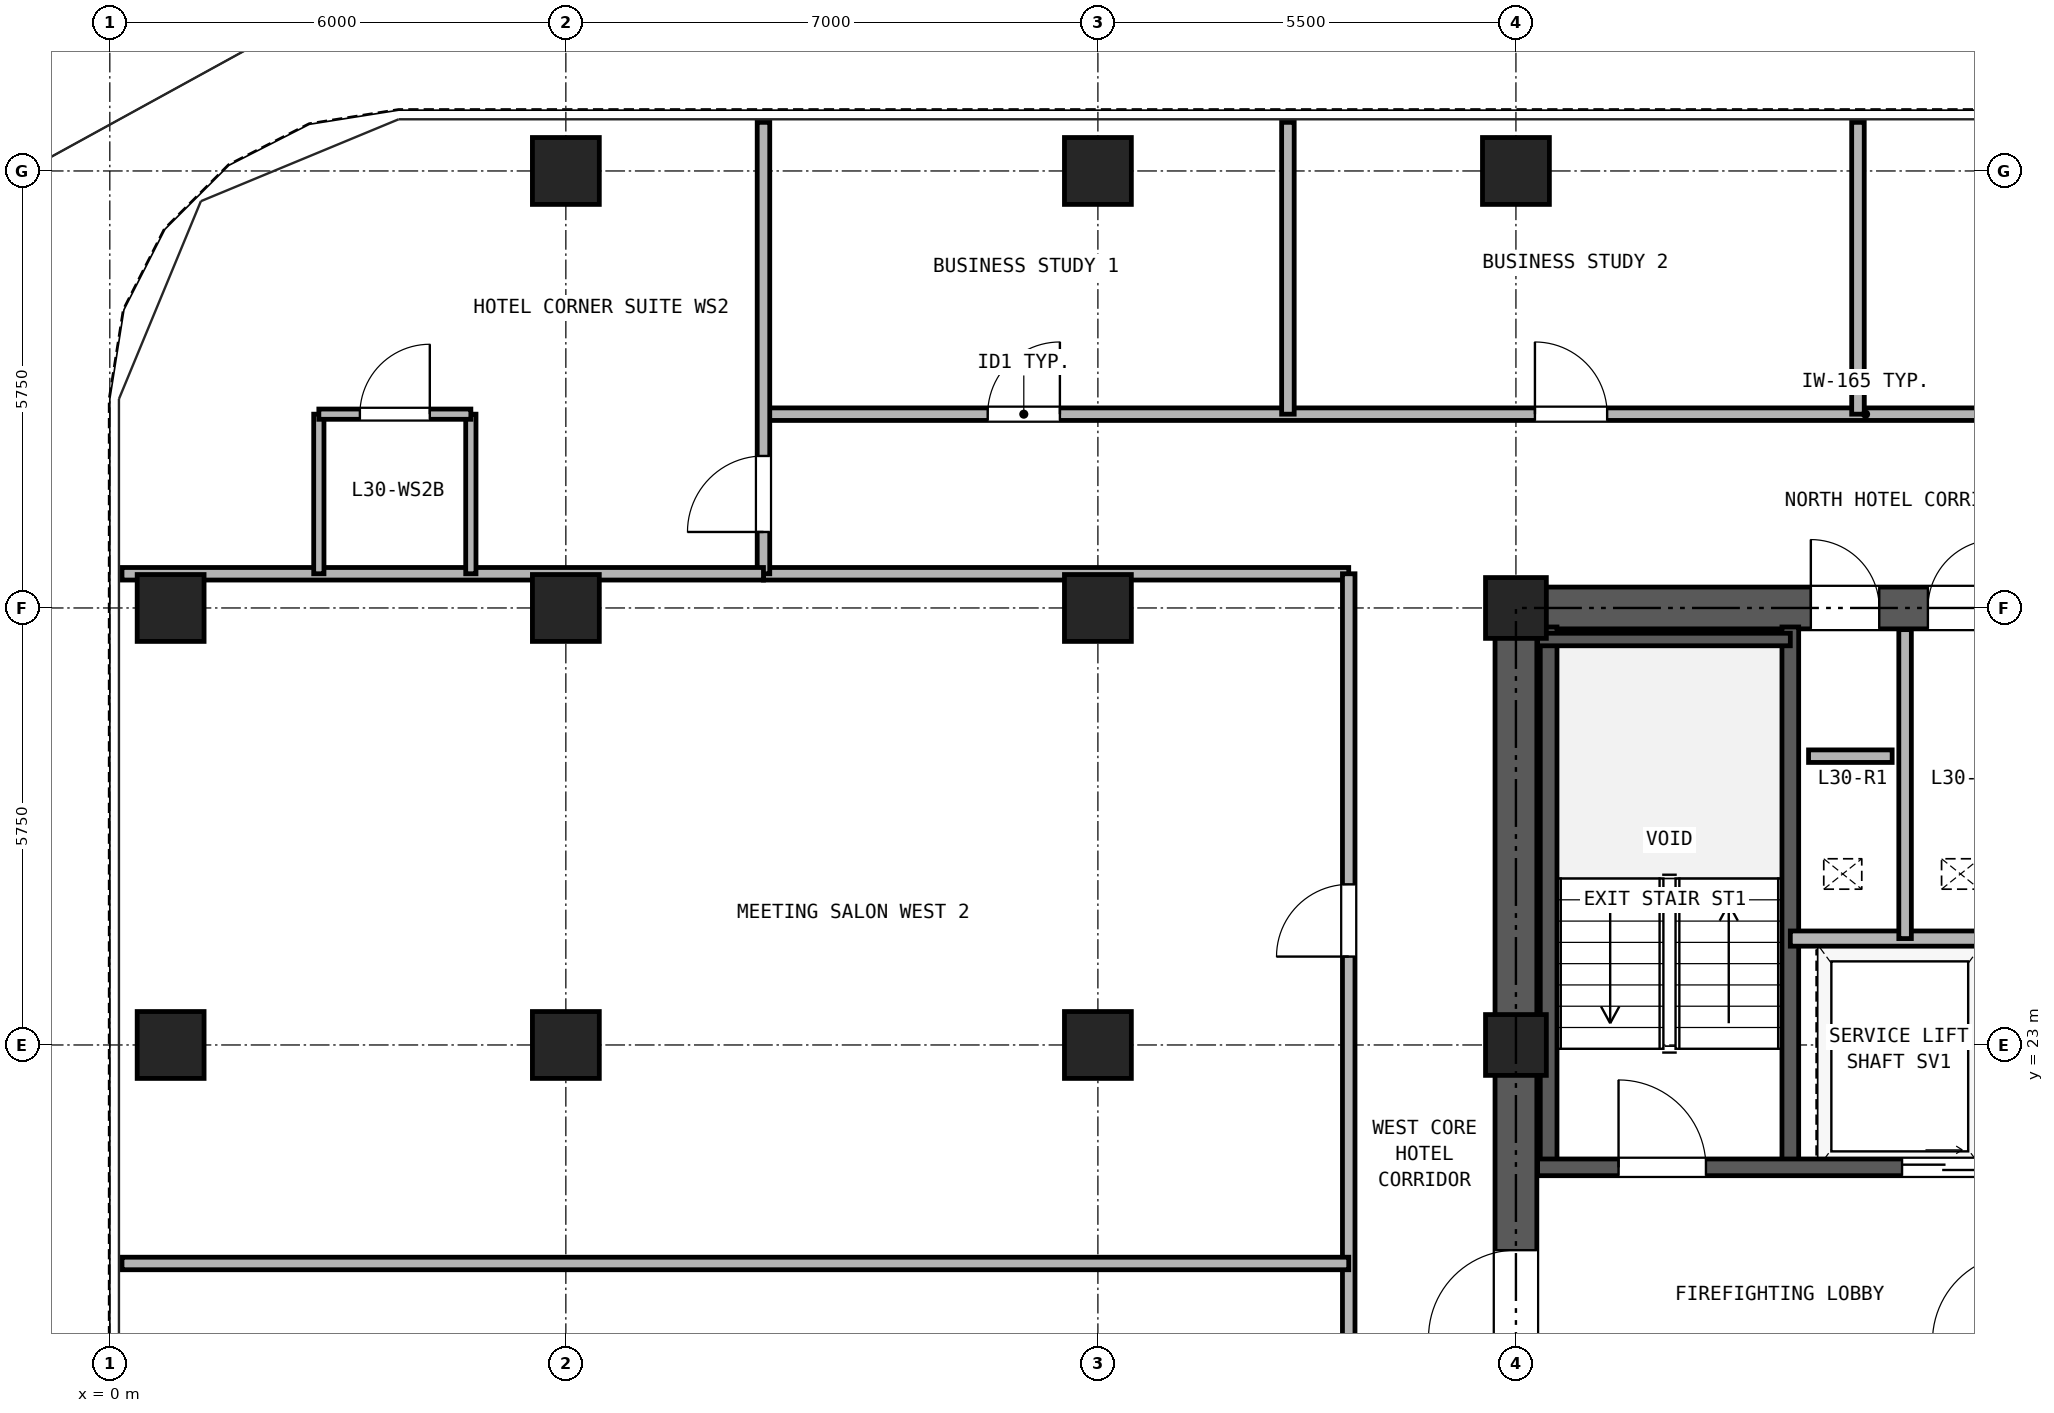
"""IFC4 building model, lengths in metres.
Left out: names, types, materials, properties, quantities, classifications, styles, units other than length and angle.
Written with IfcOpenShell. Run it as: python <this file> out.ifc"""

import sys

from ifc_helpers import new_model, si_unit, direction, frame, frame_2d, origin, origin_2d, place, context, subcontext, project, spatial, rectangle, hollow_rectangle, extrude, source, transform, mapped, element, fill, save


model = new_model("IFC4")
c1 = context("Model", 3, precision=1e-05, world=origin(), true_north=direction((0.0, 1.0)))
c2 = subcontext(c1, "Body", "Model", "MODEL_VIEW")
j1 = project(units=[si_unit("LENGTHUNIT", "METRE"), si_unit("PLANEANGLEUNIT", "RADIAN")], contexts=[c1])
p1 = place(None, origin())
s1 = spatial("IfcSite", under=j1, at=p1, CompositionType="ELEMENT")
p2 = place(p1, origin())
s2 = spatial("IfcBuilding", under=s1, at=p2, CompositionType="ELEMENT")
p3 = place(p2, frame((0.0, 0.0, 111.9)))
s3 = spatial("IfcBuildingStorey", under=s2, at=p3, CompositionType="ELEMENT", Elevation=111.9)
m1 = source(origin(), c2, "Body", "SweptSolid", [
    extrude(hollow_rectangle(XDim=0.88, YDim=0.88, WallThickness=0.05, at=origin_2d()), origin(), (0.0, 0.0, 1.0), 2.95),
])
for number, where, z_axis, x_axis in (
    (1, (6.0, 34.5, 0.0), (0.0, 0.0, 1.0), (1.0, 0.0, 0.0)),
    (2, (13.0, 34.5, 0.0), (0.0, 0.0, 1.0), (1.0, 0.0, 0.0)),
    (3, (18.5, 34.5, 0.0), (0.0, 0.0, 1.0), (1.0, 0.0, 0.0)),
    (4, (0.8, 23.0, 0.0), (0.0, 0.0, 1.0), (1.0, 0.0, 0.0)),
    (5, (0.8, 28.75, 0.0), (0.0, 0.0, 1.0), (1.0, 0.0, 0.0)),
    (6, (6.0, 23.0, 0.0), (0.0, 0.0, 1.0), (1.0, 0.0, 0.0)),
    (7, (6.0, 28.75, 0.0), (0.0, 0.0, 1.0), (1.0, 0.0, 0.0)),
    (8, (13.0, 23.0, 0.0), (0.0, 0.0, 1.0), (1.0, 0.0, 0.0)),
    (9, (13.0, 28.75, 0.0), (0.0, 0.0, 1.0), (1.0, 0.0, 0.0)),
):
    element("IfcColumn", number, at=place(p3, frame(where, z_axis=z_axis, x_axis=x_axis)), inside=s3, PredefinedType="COLUMN", context=c2, shape_type="MappedRepresentation", body=[
        mapped(m1, transform((0.0, 0.0, 0.0), x_axis=(1.0, 0.0, 0.0), y_axis=(0.0, 1.0, 0.0), z_axis=(0.0, 0.0, 1.0), scale=1.0)),
    ])
m2 = source(origin(), c2, "Body", "SweptSolid", [
    extrude(hollow_rectangle(XDim=0.8, YDim=0.8, WallThickness=0.045, at=origin_2d()), origin(), (0.0, 0.0, 1.0), 2.95),
])
for number, where, z_axis, x_axis in (
    (10, (18.5, 23.0, 0.0), (0.0, 0.0, 1.0), (1.0, 0.0, 0.0)),
    (11, (18.5, 28.75, 0.0), (0.0, 0.0, 1.0), (1.0, 0.0, 0.0)),
):
    element("IfcColumn", number, at=place(p3, frame(where, z_axis=z_axis, x_axis=x_axis)), inside=s3, PredefinedType="COLUMN", context=c2, shape_type="MappedRepresentation", body=[
        mapped(m2, transform((0.0, 0.0, 0.0), x_axis=(1.0, 0.0, 0.0), y_axis=(0.0, 1.0, 0.0), z_axis=(0.0, 0.0, 1.0), scale=1.0)),
    ])
p4 = place(p3, frame((18.225, 28.75, 0.0), z_axis=(0.0, 0.0, 1.0), x_axis=(1.0, 0.0, 0.0)))
e12 = element("IfcWall", 12, at=p4, inside=s3, PredefinedType="SHEAR", context=c2, shape_type="SweptSolid", body=[
    extrude(rectangle(XDim=10.55, YDim=0.55, at=frame_2d((5.275, 0.0))), origin(), (0.0, 0.0, 1.0), 2.95),
])
p5 = place(p4, frame((4.155, 0.0, 0.0)))
e13 = element("IfcOpeningElement", 13, at=p5, cuts=e12, PredefinedType="OPENING", context=c2, shape_type="SweptSolid", body=[
    extrude(rectangle(XDim=0.9, YDim=2.05, at=frame_2d((0.45, 1.025))), frame((0.0, 0.285, 0.0), z_axis=(0.0, -1.0, 0.0), x_axis=(1.0, 0.0, 0.0)), (0.0, 0.0, 1.0), 0.57),
])
p6 = place(p4, frame((5.695, 0.0, 0.0)))
e14 = element("IfcOpeningElement", 14, at=p6, cuts=e12, PredefinedType="OPENING", context=c2, shape_type="SweptSolid", body=[
    extrude(rectangle(XDim=0.9, YDim=2.05, at=frame_2d((0.45, 1.025))), frame((0.0, 0.285, 0.0), z_axis=(0.0, -1.0, 0.0), x_axis=(1.0, 0.0, 0.0)), (0.0, 0.0, 1.0), 0.57),
])
p7 = place(p3, frame((18.5, 11.775, 0.0), z_axis=(0.0, 0.0, 1.0), x_axis=(0.0, 1.0, 0.0)))
e15 = element("IfcWall", 15, at=p7, inside=s3, PredefinedType="SHEAR", context=c2, shape_type="SweptSolid", body=[
    extrude(rectangle(XDim=16.7, YDim=0.55, at=frame_2d((8.35, 0.0))), origin(), (0.0, 0.0, 1.0), 2.95),
])
p8 = place(p7, frame((7.375, 0.0, 0.0)))
e16 = element("IfcOpeningElement", 16, at=p8, cuts=e15, PredefinedType="OPENING", context=c2, shape_type="SweptSolid", body=[
    extrude(rectangle(XDim=1.15, YDim=2.2, at=frame_2d((0.575, 1.1))), frame((0.0, 0.285, 0.0), z_axis=(0.0, -1.0, 0.0), x_axis=(1.0, 0.0, 0.0)), (0.0, 0.0, 1.0), 0.57),
])
for number, where, z_axis, x_axis in (
    (17, (18.93, 21.39, 0.0), (0.0, 0.0, 1.0), (0.0, 1.0, 0.0)),
    (18, (22.11, 21.39, 0.0), (0.0, 0.0, 1.0), (0.0, 1.0, 0.0)),
):
    element("IfcWall", number, at=place(p3, frame(where, z_axis=z_axis, x_axis=x_axis)), inside=s3, PredefinedType="SOLIDWALL", context=c2, shape_type="SweptSolid", body=[
        extrude(rectangle(XDim=7.11, YDim=0.22, at=frame_2d((3.555, 0.0))), origin(), (0.0, 0.0, 1.0), 2.95),
    ])
p9 = place(p3, frame((18.785, 28.335, 0.0), z_axis=(0.0, 0.0, 1.0), x_axis=(1.0, 0.0, 0.0)))
e19 = element("IfcWall", 19, at=p9, inside=s3, PredefinedType="PARTITIONING", context=c2, shape_type="SweptSolid", body=[
    extrude(rectangle(XDim=3.325, YDim=0.165, at=frame_2d((1.663, 0.0))), origin(), (0.0, 0.0, 1.0), 2.95),
])
p10 = place(p3, frame((18.785, 21.39, 0.0), z_axis=(0.0, 0.0, 1.0), x_axis=(1.0, 0.0, 0.0)))
e20 = element("IfcWall", 20, at=p10, inside=s3, PredefinedType="SOLIDWALL", context=c2, shape_type="SweptSolid", body=[
    extrude(rectangle(XDim=6.345, YDim=0.22, at=frame_2d((3.172, 0.0))), origin(), (0.0, 0.0, 1.0), 2.95),
])
p11 = place(p10, frame((1.065, 0.0, 0.0)))
e21 = element("IfcOpeningElement", 21, at=p11, cuts=e20, PredefinedType="OPENING", context=c2, shape_type="SweptSolid", body=[
    extrude(rectangle(XDim=1.15, YDim=2.2, at=frame_2d((0.575, 1.1))), frame((0.0, 0.12, 0.0), z_axis=(0.0, -1.0, 0.0), x_axis=(1.0, 0.0, 0.0)), (0.0, 0.0, 1.0), 0.24),
])
p12 = place(p10, frame((4.795, 0.0, 0.0)))
e22 = element("IfcOpeningElement", 22, at=p12, cuts=e20, PredefinedType="OPENING", context=c2, shape_type="SweptSolid", body=[
    extrude(rectangle(XDim=1.1, YDim=2.25, at=frame_2d((0.55, 1.125))), frame((0.0, 0.12, 0.0), z_axis=(0.0, -1.0, 0.0), x_axis=(1.0, 0.0, 0.0)), (0.0, 0.0, 1.0), 0.24),
])
p13 = place(p3, frame((22.11, 24.4, 0.0), z_axis=(0.0, 0.0, 1.0), x_axis=(1.0, 0.0, 0.0)))
e23 = element("IfcWall", 23, at=p13, inside=s3, PredefinedType="PARTITIONING", context=c2, shape_type="SweptSolid", body=[
    extrude(rectangle(XDim=3.02, YDim=0.2, at=frame_2d((1.51, 0.0))), origin(), (0.0, 0.0, 1.0), 2.95),
])
p14 = place(p3, frame((23.62, 24.4, 0.0), z_axis=(0.0, 0.0, 1.0), x_axis=(0.0, 1.0, 0.0)))
e24 = element("IfcWall", 24, at=p14, inside=s3, PredefinedType="PARTITIONING", context=c2, shape_type="SweptSolid", body=[
    extrude(rectangle(XDim=4.065, YDim=0.165, at=frame_2d((2.033, 0.0))), origin(), (0.0, 0.0, 1.0), 2.95),
])
p15 = place(p3, frame((8.6, 31.3, 0.0), z_axis=(0.0, 0.0, 1.0), x_axis=(1.0, 0.0, 0.0)))
e25 = element("IfcWall", 25, at=p15, inside=s3, PredefinedType="PARTITIONING", context=c2, shape_type="SweptSolid", body=[
    extrude(rectangle(XDim=29.8, YDim=0.165, at=frame_2d((14.9, 0.0))), origin(), (0.0, 0.0, 1.0), 2.95),
])
p16 = place(p15, frame((2.95, 0.0, 0.0)))
e26 = element("IfcOpeningElement", 26, at=p16, cuts=e25, PredefinedType="OPENING", context=c2, shape_type="SweptSolid", body=[
    extrude(rectangle(XDim=0.95, YDim=2.15, at=frame_2d((0.475, 1.075))), frame((0.0, 0.093, 0.0), z_axis=(0.0, -1.0, 0.0), x_axis=(1.0, 0.0, 0.0)), (0.0, 0.0, 1.0), 0.185),
])
p17 = place(p15, frame((10.15, 0.0, 0.0)))
e27 = element("IfcOpeningElement", 27, at=p17, cuts=e25, PredefinedType="OPENING", context=c2, shape_type="SweptSolid", body=[
    extrude(rectangle(XDim=0.95, YDim=2.15, at=frame_2d((0.475, 1.075))), frame((0.0, 0.093, 0.0), z_axis=(0.0, -1.0, 0.0), x_axis=(1.0, 0.0, 0.0)), (0.0, 0.0, 1.0), 0.185),
])
p18 = place(p15, frame((17.9, 0.0, 0.0)))
e28 = element("IfcOpeningElement", 28, at=p18, cuts=e25, PredefinedType="OPENING", context=c2, shape_type="SweptSolid", body=[
    extrude(rectangle(XDim=0.95, YDim=2.15, at=frame_2d((0.475, 1.075))), frame((0.0, 0.093, 0.0), z_axis=(0.0, -1.0, 0.0), x_axis=(1.0, 0.0, 0.0)), (0.0, 0.0, 1.0), 0.185),
])
p19 = place(p15, frame((23.9, 0.0, 0.0)))
e29 = element("IfcOpeningElement", 29, at=p19, cuts=e25, PredefinedType="OPENING", context=c2, shape_type="SweptSolid", body=[
    extrude(rectangle(XDim=0.92, YDim=2.1, at=frame_2d((0.46, 1.05))), frame((0.0, 0.093, 0.0), z_axis=(0.0, -1.0, 0.0), x_axis=(1.0, 0.0, 0.0)), (0.0, 0.0, 1.0), 0.185),
])
p20 = place(p15, frame((27.6, 0.0, 0.0)))
e30 = element("IfcOpeningElement", 30, at=p20, cuts=e25, PredefinedType="OPENING", context=c2, shape_type="SweptSolid", body=[
    extrude(rectangle(XDim=0.92, YDim=2.1, at=frame_2d((0.46, 1.05))), frame((0.0, 0.093, 0.0), z_axis=(0.0, -1.0, 0.0), x_axis=(1.0, 0.0, 0.0)), (0.0, 0.0, 1.0), 0.185),
])
p21 = place(p3, frame((8.6, 29.2, 0.0), z_axis=(0.0, 0.0, 1.0), x_axis=(1.0, 0.0, 0.0)))
e31 = element("IfcWall", 31, at=p21, inside=s3, PredefinedType="PARTITIONING", context=c2, shape_type="SweptSolid", body=[
    extrude(rectangle(XDim=7.7, YDim=0.165, at=frame_2d((3.85, 0.0))), origin(), (0.0, 0.0, 1.0), 2.95),
])
p22 = place(p3, frame((16.3, 11.05, 0.0), z_axis=(0.0, 0.0, 1.0), x_axis=(0.0, 1.0, 0.0)))
e32 = element("IfcWall", 32, at=p22, inside=s3, PredefinedType="PARTITIONING", context=c2, shape_type="SweptSolid", body=[
    extrude(rectangle(XDim=18.15, YDim=0.165, at=frame_2d((9.075, 0.0))), origin(), (0.0, 0.0, 1.0), 2.95),
])
p23 = place(p22, frame((4.037, 0.0, 0.0)))
e33 = element("IfcOpeningElement", 33, at=p23, cuts=e32, PredefinedType="OPENING", context=c2, shape_type="SweptSolid", body=[
    extrude(rectangle(XDim=0.95, YDim=2.15, at=frame_2d((0.475, 1.075))), frame((0.0, 0.093, 0.0), z_axis=(0.0, -1.0, 0.0), x_axis=(1.0, 0.0, 0.0)), (0.0, 0.0, 1.0), 0.185),
])
p24 = place(p22, frame((13.113, 0.0, 0.0)))
e34 = element("IfcOpeningElement", 34, at=p24, cuts=e32, PredefinedType="OPENING", context=c2, shape_type="SweptSolid", body=[
    extrude(rectangle(XDim=0.95, YDim=2.15, at=frame_2d((0.475, 1.075))), frame((0.0, 0.093, 0.0), z_axis=(0.0, -1.0, 0.0), x_axis=(1.0, 0.0, 0.0)), (0.0, 0.0, 1.0), 0.185),
])
p25 = place(p3, frame((8.6, 29.2, 0.0), z_axis=(0.0, 0.0, 1.0), x_axis=(0.0, 1.0, 0.0)))
e35 = element("IfcWall", 35, at=p25, inside=s3, PredefinedType="PARTITIONING", context=c2, shape_type="SweptSolid", body=[
    extrude(rectangle(XDim=5.94, YDim=0.165, at=frame_2d((2.97, 0.0))), origin(), (0.0, 0.0, 1.0), 2.95),
])
p26 = place(p25, frame((0.55, 0.0, 0.0)))
e36 = element("IfcOpeningElement", 36, at=p26, cuts=e35, PredefinedType="OPENING", context=c2, shape_type="SweptSolid", body=[
    extrude(rectangle(XDim=1.0, YDim=2.15, at=frame_2d((0.5, 1.075))), frame((0.0, 0.093, 0.0), z_axis=(0.0, -1.0, 0.0), x_axis=(1.0, 0.0, 0.0)), (0.0, 0.0, 1.0), 0.185),
])
p27 = place(p3, frame((0.16, 29.2, 0.0), z_axis=(0.0, 0.0, 1.0), x_axis=(1.0, 0.0, 0.0)))
e37 = element("IfcWall", 37, at=p27, inside=s3, PredefinedType="PARTITIONING", context=c2, shape_type="SweptSolid", body=[
    extrude(rectangle(XDim=8.44, YDim=0.165, at=frame_2d((4.22, 0.0))), origin(), (0.0, 0.0, 1.0), 2.95),
])
for number, where, z_axis, x_axis in (
    (38, (2.75, 29.2, 0.0), (0.0, 0.0, 1.0), (0.0, 1.0, 0.0)),
    (39, (4.75, 29.2, 0.0), (0.0, 0.0, 1.0), (0.0, 1.0, 0.0)),
):
    element("IfcWall", number, at=place(p3, frame(where, z_axis=z_axis, x_axis=x_axis)), inside=s3, PredefinedType="PARTITIONING", context=c2, shape_type="SweptSolid", body=[
        extrude(rectangle(XDim=2.1, YDim=0.135, at=frame_2d((1.05, 0.0))), origin(), (0.0, 0.0, 1.0), 2.95),
    ])
p28 = place(p3, frame((2.75, 31.3, 0.0), z_axis=(0.0, 0.0, 1.0), x_axis=(1.0, 0.0, 0.0)))
e40 = element("IfcWall", 40, at=p28, inside=s3, PredefinedType="PARTITIONING", context=c2, shape_type="SweptSolid", body=[
    extrude(rectangle(XDim=2.0, YDim=0.135, at=frame_2d((1.0, 0.0))), origin(), (0.0, 0.0, 1.0), 2.95),
])
p29 = place(p28, frame((0.54, 0.0, 0.0)))
e41 = element("IfcOpeningElement", 41, at=p29, cuts=e40, PredefinedType="OPENING", context=c2, shape_type="SweptSolid", body=[
    extrude(rectangle(XDim=0.92, YDim=2.1, at=frame_2d((0.46, 1.05))), frame((0.0, 0.077, 0.0), z_axis=(0.0, -1.0, 0.0), x_axis=(1.0, 0.0, 0.0)), (0.0, 0.0, 1.0), 0.155),
])
for number, where, z_axis, x_axis in (
    (42, (15.5, 31.3, 0.0), (0.0, 0.0, 1.0), (0.0, 1.0, 0.0)),
    (43, (23.0, 31.3, 0.0), (0.0, 0.0, 1.0), (0.0, 1.0, 0.0)),
):
    element("IfcWall", number, at=place(p3, frame(where, z_axis=z_axis, x_axis=x_axis)), inside=s3, PredefinedType="PARTITIONING", context=c2, shape_type="SweptSolid", body=[
        extrude(rectangle(XDim=3.84, YDim=0.165, at=frame_2d((1.92, 0.0))), origin(), (0.0, 0.0, 1.0), 2.95),
    ])
p30 = place(p3, frame((0.16, 20.125, 0.0), z_axis=(0.0, 0.0, 1.0), x_axis=(1.0, 0.0, 0.0)))
e44 = element("IfcWall", 44, at=p30, inside=s3, PredefinedType="PARTITIONING", context=c2, shape_type="SweptSolid", body=[
    extrude(rectangle(XDim=16.14, YDim=0.165, at=frame_2d((8.07, 0.0))), origin(), (0.0, 0.0, 1.0), 2.583),
])
p31 = place(p3, frame((22.35, 26.8, 0.0), z_axis=(0.0, 0.0, 1.0), x_axis=(1.0, 0.0, 0.0)))
e45 = element("IfcWall", 45, at=p31, inside=s3, PredefinedType="PARTITIONING", context=c2, shape_type="SweptSolid", body=[
    extrude(rectangle(XDim=1.1, YDim=0.165, at=frame_2d((0.55, 0.0))), origin(), (0.0, 0.0, 1.0), 2.95),
])
p32 = place(p11, frame((1.15, 0.0, 0.0), z_axis=(0.0, 0.0, 1.0), x_axis=(-1.0, 0.0, 0.0)))
e46 = element("IfcDoor", 46, at=p32, inside=s3, OperationType="SINGLE_SWING_LEFT", PredefinedType="DOOR", context=c2, shape_type="SweptSolid", body=[
    extrude(rectangle(XDim=1.15, YDim=2.2, at=frame_2d((0.575, 1.1))), frame((0.0, 0.025, 0.0), z_axis=(0.0, -1.0, 0.0), x_axis=(1.0, 0.0, 0.0)), (0.0, 0.0, 1.0), 0.05),
])
fill(e21, e46)
p33 = place(p12, frame((1.1, 0.0, 0.0), z_axis=(0.0, 0.0, 1.0), x_axis=(-1.0, 0.0, 0.0)))
e47 = element("IfcDoor", 47, at=p33, inside=s3, OperationType="DOUBLE_DOOR_SLIDING", PredefinedType="DOOR", context=c2, shape_type="SweptSolid", body=[
    extrude(rectangle(XDim=1.1, YDim=2.25, at=frame_2d((0.55, 1.125))), frame((0.0, 0.025, 0.0), z_axis=(0.0, -1.0, 0.0), x_axis=(1.0, 0.0, 0.0)), (0.0, 0.0, 1.0), 0.05),
])
fill(e22, e47)
p34 = place(p8, frame((1.15, 0.0, 0.0), z_axis=(0.0, 0.0, 1.0), x_axis=(-1.0, 0.0, 0.0)))
e48 = element("IfcDoor", 48, at=p34, inside=s3, OperationType="SINGLE_SWING_LEFT", PredefinedType="DOOR", context=c2, shape_type="SweptSolid", body=[
    extrude(rectangle(XDim=1.15, YDim=2.2, at=frame_2d((0.575, 1.1))), frame((0.0, 0.025, 0.0), z_axis=(0.0, -1.0, 0.0), x_axis=(1.0, 0.0, 0.0)), (0.0, 0.0, 1.0), 0.05),
])
fill(e16, e48)
p35 = place(p5, origin())
e49 = element("IfcDoor", 49, at=p35, inside=s3, OperationType="SINGLE_SWING_LEFT", PredefinedType="DOOR", context=c2, shape_type="SweptSolid", body=[
    extrude(rectangle(XDim=0.9, YDim=2.05, at=frame_2d((0.45, 1.025))), frame((0.0, 0.025, 0.0), z_axis=(0.0, -1.0, 0.0), x_axis=(1.0, 0.0, 0.0)), (0.0, 0.0, 1.0), 0.05),
])
fill(e13, e49)
p36 = place(p6, origin())
e50 = element("IfcDoor", 50, at=p36, inside=s3, OperationType="SINGLE_SWING_RIGHT", PredefinedType="DOOR", context=c2, shape_type="SweptSolid", body=[
    extrude(rectangle(XDim=0.9, YDim=2.05, at=frame_2d((0.45, 1.025))), frame((0.0, 0.025, 0.0), z_axis=(0.0, -1.0, 0.0), x_axis=(1.0, 0.0, 0.0)), (0.0, 0.0, 1.0), 0.05),
])
fill(e14, e50)
p37 = place(p29, frame((0.92, 0.0, 0.0), z_axis=(0.0, 0.0, 1.0), x_axis=(-1.0, 0.0, 0.0)))
e51 = element("IfcDoor", 51, at=p37, inside=s3, OperationType="SINGLE_SWING_RIGHT", PredefinedType="DOOR", context=c2, shape_type="SweptSolid", body=[
    extrude(rectangle(XDim=0.92, YDim=2.1, at=frame_2d((0.46, 1.05))), frame((0.0, 0.025, 0.0), z_axis=(0.0, -1.0, 0.0), x_axis=(1.0, 0.0, 0.0)), (0.0, 0.0, 1.0), 0.05),
])
fill(e41, e51)
p38 = place(p26, origin())
e52 = element("IfcDoor", 52, at=p38, inside=s3, OperationType="SINGLE_SWING_LEFT", PredefinedType="DOOR", context=c2, shape_type="SweptSolid", body=[
    extrude(rectangle(XDim=1.0, YDim=2.15, at=frame_2d((0.5, 1.075))), frame((0.0, 0.025, 0.0), z_axis=(0.0, -1.0, 0.0), x_axis=(1.0, 0.0, 0.0)), (0.0, 0.0, 1.0), 0.05),
])
fill(e36, e52)
p39 = place(p16, origin())
e53 = element("IfcDoor", 53, at=p39, inside=s3, OperationType="SINGLE_SWING_RIGHT", PredefinedType="DOOR", context=c2, shape_type="SweptSolid", body=[
    extrude(rectangle(XDim=0.95, YDim=2.15, at=frame_2d((0.475, 1.075))), frame((0.0, 0.025, 0.0), z_axis=(0.0, -1.0, 0.0), x_axis=(1.0, 0.0, 0.0)), (0.0, 0.0, 1.0), 0.05),
])
fill(e26, e53)
p40 = place(p17, origin())
e54 = element("IfcDoor", 54, at=p40, inside=s3, OperationType="SINGLE_SWING_LEFT", PredefinedType="DOOR", context=c2, shape_type="SweptSolid", body=[
    extrude(rectangle(XDim=0.95, YDim=2.15, at=frame_2d((0.475, 1.075))), frame((0.0, 0.025, 0.0), z_axis=(0.0, -1.0, 0.0), x_axis=(1.0, 0.0, 0.0)), (0.0, 0.0, 1.0), 0.05),
])
fill(e27, e54)
p41 = place(p24, frame((0.95, 0.0, 0.0), z_axis=(0.0, 0.0, 1.0), x_axis=(-1.0, 0.0, 0.0)))
e55 = element("IfcDoor", 55, at=p41, inside=s3, OperationType="SINGLE_SWING_LEFT", PredefinedType="DOOR", context=c2, shape_type="SweptSolid", body=[
    extrude(rectangle(XDim=0.95, YDim=2.15, at=frame_2d((0.475, 1.075))), frame((0.0, 0.025, 0.0), z_axis=(0.0, -1.0, 0.0), x_axis=(1.0, 0.0, 0.0)), (0.0, 0.0, 1.0), 0.05),
])
fill(e34, e55)
save(model, sys.argv[1])
